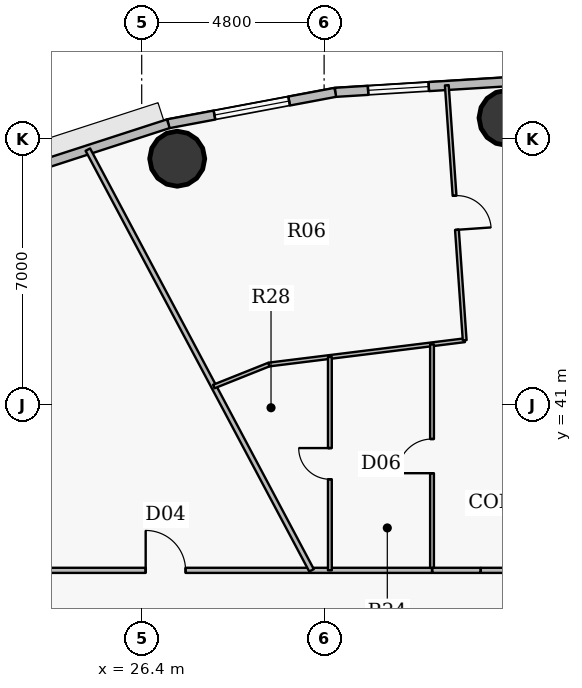
"""IFC4 building model, lengths in metres.
Left out: names, types, materials, properties, quantities, classifications, styles, units other than length and angle.
Written with IfcOpenShell. Run it as: python <this file> out.ifc"""

import sys

from ifc_helpers import new_model, si_unit, direction, frame, frame_2d, origin, origin_2d, place, context, subcontext, project, spatial, rectangle, hollow_circle, extrude, source, transform, mapped, element, fill, save


model = new_model("IFC4")
c1 = context("Model", 3, precision=1e-05, world=origin(), true_north=direction((0.0, 1.0)))
c2 = subcontext(c1, "Body", "Model", "MODEL_VIEW")
j1 = project(units=[si_unit("LENGTHUNIT", "METRE"), si_unit("PLANEANGLEUNIT", "RADIAN")], contexts=[c1])
p1 = place(None, origin())
s1 = spatial("IfcSite", under=j1, at=p1, CompositionType="ELEMENT")
p2 = place(p1, origin())
s2 = spatial("IfcBuilding", under=s1, at=p2, CompositionType="ELEMENT")
p3 = place(p2, frame((0.0, 0.0, 127.2)))
s3 = spatial("IfcBuildingStorey", under=s2, at=p3, CompositionType="ELEMENT", Elevation=127.2)
for number, where, z_axis, x_axis in (
    (1, (36.0, 48.555, 0.0), (0.0, 0.0, 1.0), (1.0, 0.0, 0.0)),
    (2, (27.334, 47.481, 0.0), (0.0, 0.0, 1.0), (1.0, 0.0, 0.0)),
):
    element("IfcColumn", number, at=place(p3, frame(where, z_axis=z_axis, x_axis=x_axis)), inside=s3, PredefinedType="COLUMN", context=c2, shape_type="SweptSolid", body=[
        extrude(hollow_circle(Radius=0.725, WallThickness=0.042, at=origin_2d()), origin(), (0.0, 0.0, 1.0), 3.75),
    ])
p4 = place(p3, frame((31.494, 49.227, 0.0), z_axis=(0.0, 0.0, 1.0), x_axis=(0.998107531589, 0.061492726276, 0.0)))
e3 = element("IfcWall", 3, at=p4, inside=s3, PredefinedType="SOLIDWALL", context=c2, shape_type="SweptSolid", body=[
    extrude(rectangle(XDim=4.514, YDim=0.24, at=frame_2d((2.257, 0.0))), origin(), (0.0, 0.0, 1.0), 3.5),
])
p5 = place(p4, frame((0.865, 0.0, 0.9)))
e4 = element("IfcOpeningElement", 4, at=p5, cuts=e3, PredefinedType="OPENING", context=c2, shape_type="SweptSolid", body=[
    extrude(rectangle(XDim=1.6, YDim=1.75, at=origin_2d()), frame((0.8, 0.13, 0.875), z_axis=(0.0, -1.0, 0.0), x_axis=(1.0, 0.0, 0.0)), (0.0, 0.0, 1.0), 0.26),
])
p6 = place(p3, frame((27.1, 48.401, 0.0), z_axis=(0.0, 0.0, 1.0), x_axis=(0.982789252177, 0.184730305596, 0.0)))
e5 = element("IfcWall", 5, at=p6, inside=s3, PredefinedType="SOLIDWALL", context=c2, shape_type="SweptSolid", body=[
    extrude(rectangle(XDim=4.471, YDim=0.24, at=frame_2d((2.235, 0.0))), origin(), (0.0, 0.0, 1.0), 3.5),
])
p7 = place(p6, frame((1.236, 0.0, 0.9)))
e6 = element("IfcOpeningElement", 6, at=p7, cuts=e5, PredefinedType="OPENING", context=c2, shape_type="SweptSolid", body=[
    extrude(rectangle(XDim=2.0, YDim=1.75, at=origin_2d()), frame((1.0, 0.13, 0.875), z_axis=(0.0, -1.0, 0.0), x_axis=(1.0, 0.0, 0.0)), (0.0, 0.0, 1.0), 0.26),
])
p8 = place(p3, frame((22.926, 47.047, 0.0), z_axis=(0.0, 0.0, 1.0), x_axis=(0.951211346073, 0.308540070495, 0.0)))
e7 = element("IfcWall", 7, at=p8, inside=s3, PredefinedType="SOLIDWALL", context=c2, shape_type="SweptSolid", body=[
    extrude(rectangle(XDim=4.388, YDim=0.24, at=frame_2d((2.194, 0.0))), origin(), (0.0, 0.0, 1.0), 3.5),
])
p9 = place(p3, frame((23.15, 36.65, 0.0), z_axis=(0.0, 0.0, 1.0), x_axis=(1.0, 0.0, 0.0)))
e8 = element("IfcWall", 8, at=p9, inside=s3, PredefinedType="PARTITIONING", context=c2, shape_type="SweptSolid", body=[
    extrude(rectangle(XDim=10.889, YDim=0.135, at=frame_2d((5.445, 0.0))), origin(), (0.0, 0.0, 1.0), 2.935),
])
p10 = place(p9, frame((3.354, 0.0, 0.0)))
e9 = element("IfcOpeningElement", 9, at=p10, cuts=e8, PredefinedType="OPENING", context=c2, shape_type="SweptSolid", body=[
    extrude(rectangle(XDim=1.05, YDim=2.15, at=origin_2d()), frame((0.525, 0.078, 1.075), z_axis=(0.0, -1.0, 0.0), x_axis=(1.0, 0.0, 0.0)), (0.0, 0.0, 1.0), 0.155),
])
p11 = place(p3, frame((24.983, 47.72, 0.0), z_axis=(0.0, 0.0, 1.0), x_axis=(0.469467959591, -0.882949508702, 0.0)))
e10 = element("IfcWall", 10, at=p11, inside=s3, PredefinedType="PARTITIONING", context=c2, shape_type="SweptSolid", body=[
    extrude(rectangle(XDim=12.537, YDim=0.135, at=frame_2d((6.269, 0.0))), origin(), (0.0, 0.0, 1.0), 2.935),
])
p12 = place(p3, frame((28.297, 41.487, 0.0), z_axis=(0.0, 0.0, 1.0), x_axis=(0.928778117732, 0.370636220602, 0.0)))
e11 = element("IfcWall", 11, at=p12, inside=s3, PredefinedType="PARTITIONING", context=c2, shape_type="SweptSolid", body=[
    extrude(rectangle(XDim=1.562, YDim=0.1, at=frame_2d((0.781, 0.0))), origin(), (0.0, 0.0, 1.0), 2.935),
])
p13 = place(p3, frame((29.749, 42.066, 0.0), z_axis=(0.0, 0.0, 1.0), x_axis=(0.992399697935, 0.123056245428, 0.0)))
e12 = element("IfcWall", 12, at=p13, inside=s3, PredefinedType="PARTITIONING", context=c2, shape_type="SweptSolid", body=[
    extrude(rectangle(XDim=5.19, YDim=0.1, at=frame_2d((2.595, 0.0))), origin(), (0.0, 0.0, 1.0), 2.935),
])
p14 = place(p3, frame((31.352, 36.65, 0.0), z_axis=(0.0, 0.0, 1.0), x_axis=(0.0, 1.0, 0.0)))
e13 = element("IfcWall", 13, at=p14, inside=s3, PredefinedType="PARTITIONING", context=c2, shape_type="SweptSolid", body=[
    extrude(rectangle(XDim=5.615, YDim=0.1, at=frame_2d((2.807, 0.0))), origin(), (0.0, 0.0, 1.0), 2.935),
])
p15 = place(p14, frame((2.397, 0.0, 0.0)))
e14 = element("IfcOpeningElement", 14, at=p15, cuts=e13, PredefinedType="OPENING", context=c2, shape_type="SweptSolid", body=[
    extrude(rectangle(XDim=0.82, YDim=2.1, at=origin_2d()), frame((0.41, 0.06, 1.05), z_axis=(0.0, -1.0, 0.0), x_axis=(1.0, 0.0, 0.0)), (0.0, 0.0, 1.0), 0.12),
])
p16 = place(p3, frame((34.039, 36.714, 0.0), z_axis=(0.0, 0.0, 1.0), x_axis=(0.0, 1.0, 0.0)))
e15 = element("IfcWall", 15, at=p16, inside=s3, PredefinedType="PARTITIONING", context=c2, shape_type="SweptSolid", body=[
    extrude(rectangle(XDim=5.884, YDim=0.1, at=frame_2d((2.942, 0.0))), origin(), (0.0, 0.0, 1.0), 3.125),
])
p17 = place(p16, frame((2.492, 0.0, 0.0)))
e16 = element("IfcOpeningElement", 16, at=p17, cuts=e15, PredefinedType="OPENING", context=c2, shape_type="SweptSolid", body=[
    extrude(rectangle(XDim=0.9, YDim=2.1, at=origin_2d()), frame((0.45, 0.06, 1.05), z_axis=(0.0, -1.0, 0.0), x_axis=(1.0, 0.0, 0.0)), (0.0, 0.0, 1.0), 0.12),
])
p18 = place(p3, frame((34.429, 49.413, 0.0), z_axis=(0.0, 0.0, 1.0), x_axis=(0.069954481801, -0.99755018444, 0.0)))
e17 = element("IfcWall", 17, at=p18, inside=s3, PredefinedType="PARTITIONING", context=c2, shape_type="SweptSolid", body=[
    extrude(rectangle(XDim=6.725, YDim=0.1, at=frame_2d((3.363, 0.0))), origin(), (0.0, 0.0, 1.0), 2.935),
])
p19 = place(p18, frame((2.913, 0.0, 0.0)))
e18 = element("IfcOpeningElement", 18, at=p19, cuts=e17, PredefinedType="OPENING", context=c2, shape_type="SweptSolid", body=[
    extrude(rectangle(XDim=0.9, YDim=2.1, at=origin_2d()), frame((0.45, 0.06, 1.05), z_axis=(0.0, -1.0, 0.0), x_axis=(1.0, 0.0, 0.0)), (0.0, 0.0, 1.0), 0.12),
])
p20 = place(p3, frame((35.323, 36.65, 0.0), z_axis=(0.0, 0.0, 1.0), x_axis=(1.0, 0.0, 0.0)))
e19 = element("IfcWall", 19, at=p20, inside=s3, PredefinedType="PARTITIONING", context=c2, shape_type="SweptSolid", body=[
    extrude(rectangle(XDim=13.527, YDim=0.135, at=frame_2d((6.763, 0.0))), origin(), (0.0, 0.0, 1.0), 2.935),
])
p21 = place(p20, frame((6.263, 0.0, 0.0)))
e20 = element("IfcOpeningElement", 20, at=p21, cuts=e19, PredefinedType="OPENING", context=c2, shape_type="SweptSolid", body=[
    extrude(rectangle(XDim=1.0, YDim=2.15, at=origin_2d()), frame((0.5, 0.078, 1.075), z_axis=(0.0, -1.0, 0.0), x_axis=(1.0, 0.0, 0.0)), (0.0, 0.0, 1.0), 0.155),
])
p22 = place(p3, frame((34.049, 36.65, 0.0), z_axis=(0.0, 0.0, 1.0), x_axis=(1.0, 0.0, 0.0)))
e21 = element("IfcWall", 21, at=p22, inside=s3, PredefinedType="PARTITIONING", context=c2, shape_type="SweptSolid", body=[
    extrude(rectangle(XDim=1.264, YDim=0.135, at=frame_2d((0.632, 0.0))), origin(), (0.0, 0.0, 1.0), 3.5),
])
m1 = source(origin(), c2, "Body", "SweptSolid", [
    extrude(rectangle(XDim=1.6, YDim=1.75, at=origin_2d()), frame((0.8, 0.03, 0.875), z_axis=(0.0, -1.0, 0.0), x_axis=(1.0, 0.0, 0.0)), (0.0, 0.0, 1.0), 0.06),
])
p23 = place(p5, origin())
e22 = element("IfcWindow", 22, at=p23, inside=s3, PartitioningType="DOUBLE_PANEL_VERTICAL", PredefinedType="WINDOW", context=c2, shape_type="MappedRepresentation", body=[
    mapped(m1, transform((0.0, 0.0, 0.0), x_axis=(1.0, 0.0, 0.0), y_axis=(0.0, 1.0, 0.0), z_axis=(0.0, 0.0, 1.0), scale=1.0)),
])
fill(e4, e22)
m2 = source(origin(), c2, "Body", "SweptSolid", [
    extrude(rectangle(XDim=2.0, YDim=1.75, at=origin_2d()), frame((1.0, 0.03, 0.875), z_axis=(0.0, -1.0, 0.0), x_axis=(1.0, 0.0, 0.0)), (0.0, 0.0, 1.0), 0.06),
])
p24 = place(p7, origin())
e23 = element("IfcWindow", 23, at=p24, inside=s3, PartitioningType="DOUBLE_PANEL_VERTICAL", PredefinedType="WINDOW", context=c2, shape_type="MappedRepresentation", body=[
    mapped(m2, transform((0.0, 0.0, 0.0), x_axis=(1.0, 0.0, 0.0), y_axis=(0.0, 1.0, 0.0), z_axis=(0.0, 0.0, 1.0), scale=1.0)),
])
fill(e6, e23)
m3 = source(origin(), c2, "Body", "SweptSolid", [
    extrude(rectangle(XDim=0.9, YDim=2.1, at=origin_2d()), frame((0.45, 0.025, 1.05), z_axis=(0.0, -1.0, 0.0), x_axis=(1.0, 0.0, 0.0)), (0.0, 0.0, 1.0), 0.05),
])
p25 = place(p19, origin())
e24 = element("IfcDoor", 24, at=p25, inside=s3, OperationType="SINGLE_SWING_RIGHT", PredefinedType="DOOR", context=c2, shape_type="MappedRepresentation", body=[
    mapped(m3, transform((0.0, 0.0, 0.0), x_axis=(1.0, 0.0, 0.0), y_axis=(0.0, 1.0, 0.0), z_axis=(0.0, 0.0, 1.0), scale=1.0)),
])
fill(e18, e24)
p26 = place(p17, origin())
e25 = element("IfcDoor", 25, at=p26, inside=s3, OperationType="SINGLE_SWING_LEFT", PredefinedType="DOOR", context=c2, shape_type="MappedRepresentation", body=[
    mapped(m3, transform((0.0, 0.0, 0.0), x_axis=(1.0, 0.0, 0.0), y_axis=(0.0, 1.0, 0.0), z_axis=(0.0, 0.0, 1.0), scale=1.0)),
])
fill(e16, e25)
m4 = source(origin(), c2, "Body", "SweptSolid", [
    extrude(rectangle(XDim=0.82, YDim=2.1, at=origin_2d()), frame((0.41, 0.025, 1.05), z_axis=(0.0, -1.0, 0.0), x_axis=(1.0, 0.0, 0.0)), (0.0, 0.0, 1.0), 0.05),
])
p27 = place(p15, origin())
e26 = element("IfcDoor", 26, at=p27, inside=s3, OperationType="SINGLE_SWING_RIGHT", PredefinedType="DOOR", context=c2, shape_type="MappedRepresentation", body=[
    mapped(m4, transform((0.0, 0.0, 0.0), x_axis=(1.0, 0.0, 0.0), y_axis=(0.0, 1.0, 0.0), z_axis=(0.0, 0.0, 1.0), scale=1.0)),
])
fill(e14, e26)
m5 = source(origin(), c2, "Body", "SweptSolid", [
    extrude(rectangle(XDim=1.05, YDim=2.15, at=origin_2d()), frame((0.525, 0.025, 1.075), z_axis=(0.0, -1.0, 0.0), x_axis=(1.0, 0.0, 0.0)), (0.0, 0.0, 1.0), 0.05),
])
p28 = place(p10, origin())
e27 = element("IfcDoor", 27, at=p28, inside=s3, OperationType="SINGLE_SWING_LEFT", PredefinedType="DOOR", context=c2, shape_type="MappedRepresentation", body=[
    mapped(m5, transform((0.0, 0.0, 0.0), x_axis=(1.0, 0.0, 0.0), y_axis=(0.0, 1.0, 0.0), z_axis=(0.0, 0.0, 1.0), scale=1.0)),
])
fill(e9, e27)
save(model, sys.argv[1])
